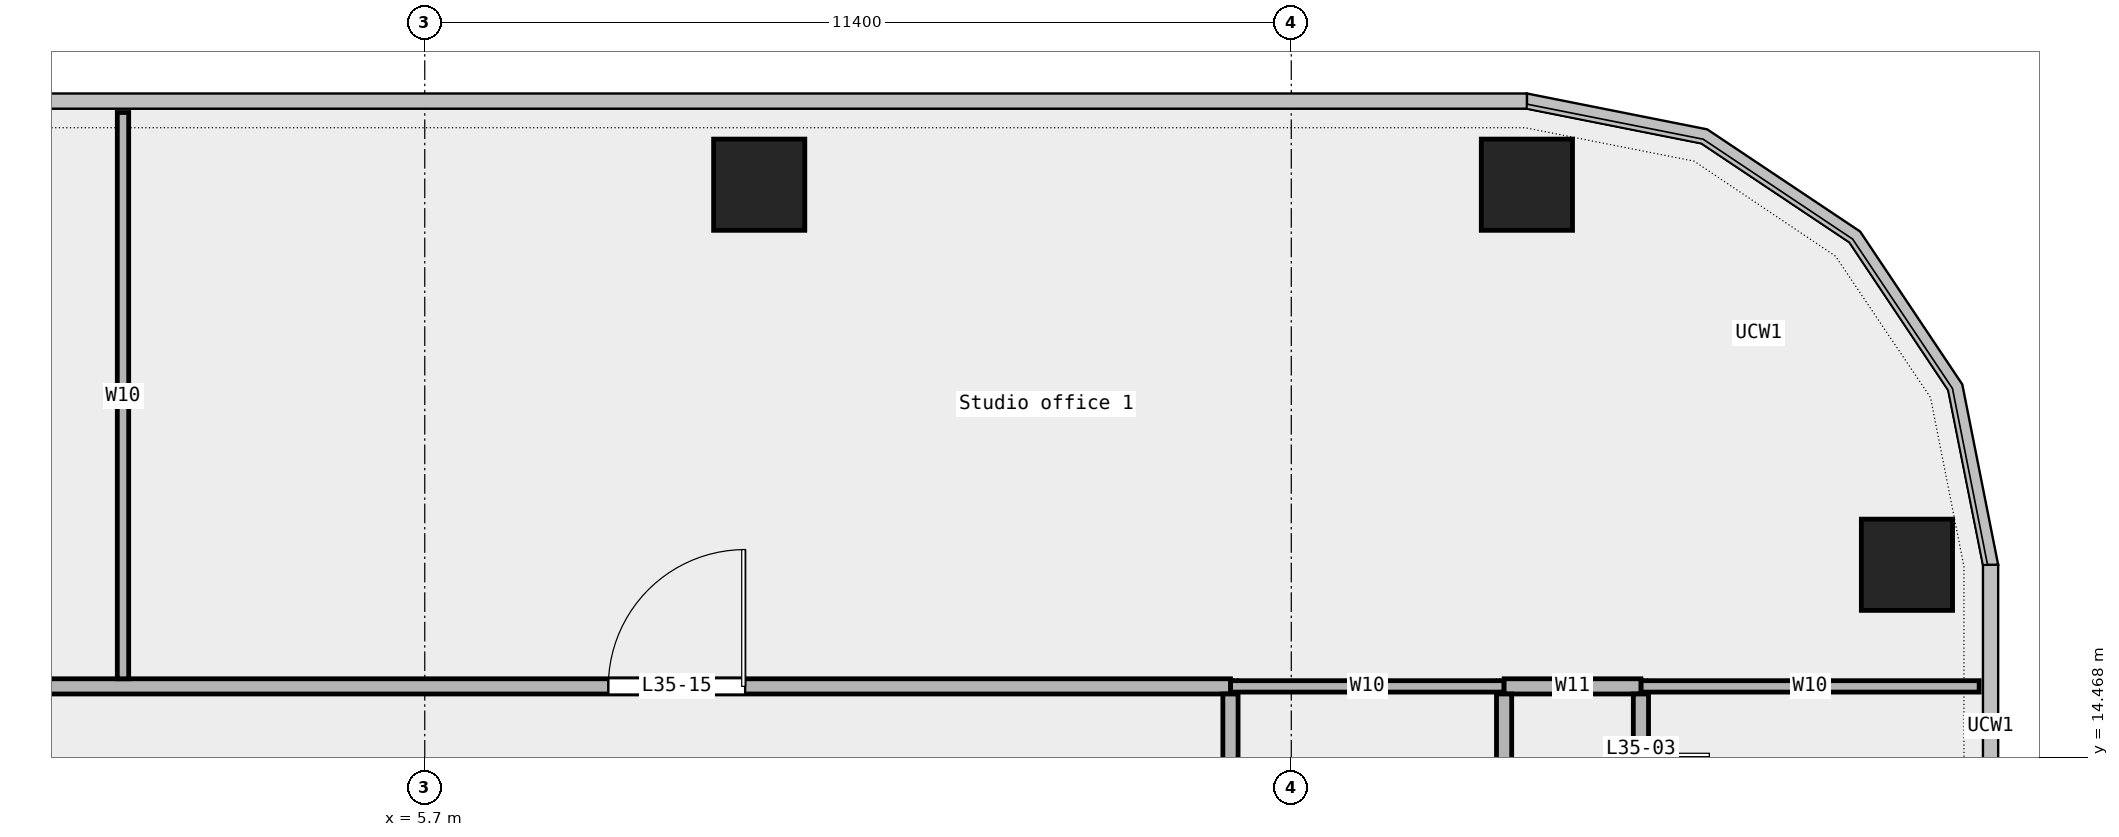
"""IFC4 building model, lengths in metres.
Left out: names, types, materials, properties, quantities, classifications, styles, units other than length and angle.
Written with IfcOpenShell. Run it as: python <this file> out.ifc"""

import sys

from ifc_helpers import new_model, si_unit, direction, frame, frame_2d, origin, origin_2d, place, context, subcontext, project, spatial, rectangle, extrude, element, fill, save


model = new_model("IFC4")
c1 = context("Model", 3, precision=1e-05, world=origin(), true_north=direction((0.0, 1.0)))
c2 = subcontext(c1, "Body", "Model", "MODEL_VIEW")
j1 = project(units=[si_unit("LENGTHUNIT", "METRE"), si_unit("PLANEANGLEUNIT", "RADIAN")], contexts=[c1])
p1 = place(None, origin())
s1 = spatial("IfcSite", under=j1, at=p1, CompositionType="ELEMENT")
p2 = place(p1, origin())
s2 = spatial("IfcBuilding", under=s1, at=p2, CompositionType="ELEMENT")
p3 = place(p2, frame((0.0, 0.0, 173.0)))
s3 = spatial("IfcBuildingStorey", under=s2, at=p3, CompositionType="ELEMENT", Elevation=173.0)
for number, where, z_axis, x_axis in (
    (1, (25.2, 17.0, 0.0), (0.0, 0.0, 1.0), (1.0, 0.0, 0.0)),
    (2, (20.2, 22.0, 0.0), (0.0, 0.0, 1.0), (1.0, 0.0, 0.0)),
    (3, (10.1, 22.0, 0.0), (0.0, 0.0, 1.0), (1.0, 0.0, 0.0)),
):
    element("IfcColumn", number, at=place(p3, frame(where, z_axis=z_axis, x_axis=x_axis)), inside=s3, PredefinedType="COLUMN", context=c2, shape_type="SweptSolid", body=[
        extrude(rectangle(XDim=1.2, YDim=1.2, at=origin_2d()), origin(), (0.0, 0.0, 1.0), 3.6),
    ])
p4 = place(p3, frame((16.3, 15.4, 0.0), z_axis=(0.0, 0.0, 1.0), x_axis=(1.0, 0.0, 0.0)))
e4 = element("IfcWall", 4, at=p4, inside=s3, PredefinedType="PARTITIONING", context=c2, shape_type="SweptSolid", body=[
    extrude(rectangle(XDim=3.6, YDim=0.15, at=frame_2d((1.8, 0.0))), origin(), (0.0, 0.0, 1.0), 3.6),
])
p5 = place(p3, frame((21.7, 15.4, 0.0), z_axis=(0.0, 0.0, 1.0), x_axis=(1.0, 0.0, 0.0)))
e5 = element("IfcWall", 5, at=p5, inside=s3, PredefinedType="PARTITIONING", context=c2, shape_type="SweptSolid", body=[
    extrude(rectangle(XDim=4.45, YDim=0.15, at=frame_2d((2.225, 0.0))), origin(), (0.0, 0.0, 1.0), 3.6),
])
p6 = place(p3, frame((-16.3, 15.4, 0.0), z_axis=(0.0, 0.0, 1.0), x_axis=(1.0, 0.0, 0.0)))
e6 = element("IfcWall", 6, at=p6, inside=s3, PredefinedType="PARTITIONING", context=c2, shape_type="SweptSolid", body=[
    extrude(rectangle(XDim=32.6, YDim=0.2, at=frame_2d((16.3, 0.0))), origin(), (0.0, 0.0, 1.0), 3.6),
])
p7 = place(p6, frame((24.415, 0.0, 0.0)))
e7 = element("IfcOpeningElement", 7, at=p7, cuts=e6, PredefinedType="OPENING", context=c2, shape_type="SweptSolid", body=[
    extrude(rectangle(XDim=1.8, YDim=2.1, at=frame_2d((0.9, 1.05))), frame((0.0, 0.112, 0.0), z_axis=(0.0, -1.0, 0.0), x_axis=(1.0, 0.0, 0.0)), (0.0, 0.0, 1.0), 0.224),
])
p8 = place(p6, frame((12.24, 0.0, 0.0)))
e8 = element("IfcOpeningElement", 8, at=p8, cuts=e6, PredefinedType="OPENING", context=c2, shape_type="SweptSolid", body=[
    extrude(rectangle(XDim=1.2, YDim=2.1, at=frame_2d((0.6, 1.05))), frame((0.0, 0.112, 0.0), z_axis=(0.0, -1.0, 0.0), x_axis=(1.0, 0.0, 0.0)), (0.0, 0.0, 1.0), 0.224),
])
p9 = place(p6, frame((3.075, 0.0, 0.0)))
e9 = element("IfcOpeningElement", 9, at=p9, cuts=e6, PredefinedType="OPENING", context=c2, shape_type="SweptSolid", body=[
    extrude(rectangle(XDim=1.5, YDim=2.1, at=frame_2d((0.75, 1.05))), frame((0.0, 0.112, 0.0), z_axis=(0.0, -1.0, 0.0), x_axis=(1.0, 0.0, 0.0)), (0.0, 0.0, 1.0), 0.224),
])
p10 = place(p3, frame((19.9, 15.4, 0.0), z_axis=(0.0, 0.0, 1.0), x_axis=(1.0, 0.0, 0.0)))
e10 = element("IfcWall", 10, at=p10, inside=s3, PredefinedType="PARTITIONING", context=c2, shape_type="SweptSolid", body=[
    extrude(rectangle(XDim=1.8, YDim=0.2, at=frame_2d((0.9, 0.0))), origin(), (0.0, 0.0, 1.0), 3.6),
])
p11 = place(p3, frame((1.73, 15.5, 0.0), z_axis=(0.0, 0.0, 1.0), x_axis=(0.0, 1.0, 0.0)))
e11 = element("IfcWall", 11, at=p11, inside=s3, PredefinedType="PARTITIONING", context=c2, shape_type="SweptSolid", body=[
    extrude(rectangle(XDim=7.45, YDim=0.15, at=frame_2d((3.725, 0.0))), origin(), (0.0, 0.0, 1.0), 3.6),
])
p12 = place(p3, frame((16.3, 11.7, 0.0), z_axis=(0.0, 0.0, 1.0), x_axis=(0.0, 1.0, 0.0)))
e12 = element("IfcWall", 12, at=p12, inside=s3, PredefinedType="PARTITIONING", context=c2, shape_type="SweptSolid", body=[
    extrude(rectangle(XDim=3.6, YDim=0.2, at=frame_2d((1.8, 0.0))), origin(), (0.0, 0.0, 1.0), 3.6),
])
p13 = place(p3, frame((19.9, -0.75, 0.0), z_axis=(0.0, 0.0, 1.0), x_axis=(0.0, 1.0, 0.0)))
e13 = element("IfcWall", 13, at=p13, inside=s3, PredefinedType="PARTITIONING", context=c2, shape_type="SweptSolid", body=[
    extrude(rectangle(XDim=16.05, YDim=0.2, at=frame_2d((8.025, 0.0))), origin(), (0.0, 0.0, 1.0), 3.6),
])
p14 = place(p13, frame((2.455, 0.0, 0.0)))
e14 = element("IfcOpeningElement", 14, at=p14, cuts=e13, PredefinedType="OPENING", context=c2, shape_type="SweptSolid", body=[
    extrude(rectangle(XDim=0.9, YDim=2.1, at=frame_2d((0.45, 1.05))), frame((0.0, 0.112, 0.0), z_axis=(0.0, -1.0, 0.0), x_axis=(1.0, 0.0, 0.0)), (0.0, 0.0, 1.0), 0.224),
])
p15 = place(p13, frame((7.802, 0.0, 0.0)))
e15 = element("IfcOpeningElement", 15, at=p15, cuts=e13, PredefinedType="OPENING", context=c2, shape_type="SweptSolid", body=[
    extrude(rectangle(XDim=0.9, YDim=2.1, at=frame_2d((0.45, 1.05))), frame((0.0, 0.112, 0.0), z_axis=(0.0, -1.0, 0.0), x_axis=(1.0, 0.0, 0.0)), (0.0, 0.0, 1.0), 0.224),
])
p16 = place(p13, frame((12.923, 0.0, 0.0)))
e16 = element("IfcOpeningElement", 16, at=p16, cuts=e13, PredefinedType="OPENING", context=c2, shape_type="SweptSolid", body=[
    extrude(rectangle(XDim=0.9, YDim=2.1, at=frame_2d((0.45, 1.05))), frame((0.0, 0.112, 0.0), z_axis=(0.0, -1.0, 0.0), x_axis=(1.0, 0.0, 0.0)), (0.0, 0.0, 1.0), 0.224),
])
p17 = place(p3, frame((21.7, -9.0, 0.0), z_axis=(0.0, 0.0, 1.0), x_axis=(0.0, 1.0, 0.0)))
e17 = element("IfcWall", 17, at=p17, inside=s3, PredefinedType="PARTITIONING", context=c2, shape_type="SweptSolid", body=[
    extrude(rectangle(XDim=24.3, YDim=0.2, at=frame_2d((12.15, 0.0))), origin(), (0.0, 0.0, 1.0), 3.6),
])
p18 = place(p17, frame((3.583, 0.0, 0.0)))
e18 = element("IfcOpeningElement", 18, at=p18, cuts=e17, PredefinedType="OPENING", context=c2, shape_type="SweptSolid", body=[
    extrude(rectangle(XDim=0.9, YDim=2.1, at=frame_2d((0.45, 1.05))), frame((0.0, 0.112, 0.0), z_axis=(0.0, -1.0, 0.0), x_axis=(1.0, 0.0, 0.0)), (0.0, 0.0, 1.0), 0.224),
])
p19 = place(p17, frame((22.575, 0.0, 0.0)))
e19 = element("IfcOpeningElement", 19, at=p19, cuts=e17, PredefinedType="OPENING", context=c2, shape_type="SweptSolid", body=[
    extrude(rectangle(XDim=0.9, YDim=2.1, at=frame_2d((0.45, 1.05))), frame((0.0, 0.112, 0.0), z_axis=(0.0, -1.0, 0.0), x_axis=(1.0, 0.0, 0.0)), (0.0, 0.0, 1.0), 0.224),
])
p20 = place(p17, frame((14.925, 0.0, 0.0)))
e20 = element("IfcOpeningElement", 20, at=p20, cuts=e17, PredefinedType="OPENING", context=c2, shape_type="SweptSolid", body=[
    extrude(rectangle(XDim=0.9, YDim=2.1, at=frame_2d((0.45, 1.05))), frame((0.0, 0.112, 0.0), z_axis=(0.0, -1.0, 0.0), x_axis=(1.0, 0.0, 0.0)), (0.0, 0.0, 1.0), 0.224),
])
p21 = place(p7, origin())
e21 = element("IfcDoor", 21, at=p21, inside=s3, OperationType="DOUBLE_DOOR_SINGLE_SWING", PredefinedType="DOOR", context=c2, shape_type="SweptSolid", body=[
    extrude(rectangle(XDim=1.8, YDim=2.1, at=frame_2d((0.9, 1.05))), frame((0.0, 0.025, 0.0), z_axis=(0.0, -1.0, 0.0), x_axis=(1.0, 0.0, 0.0)), (0.0, 0.0, 1.0), 0.05),
])
fill(e7, e21)
save(model, sys.argv[1])
